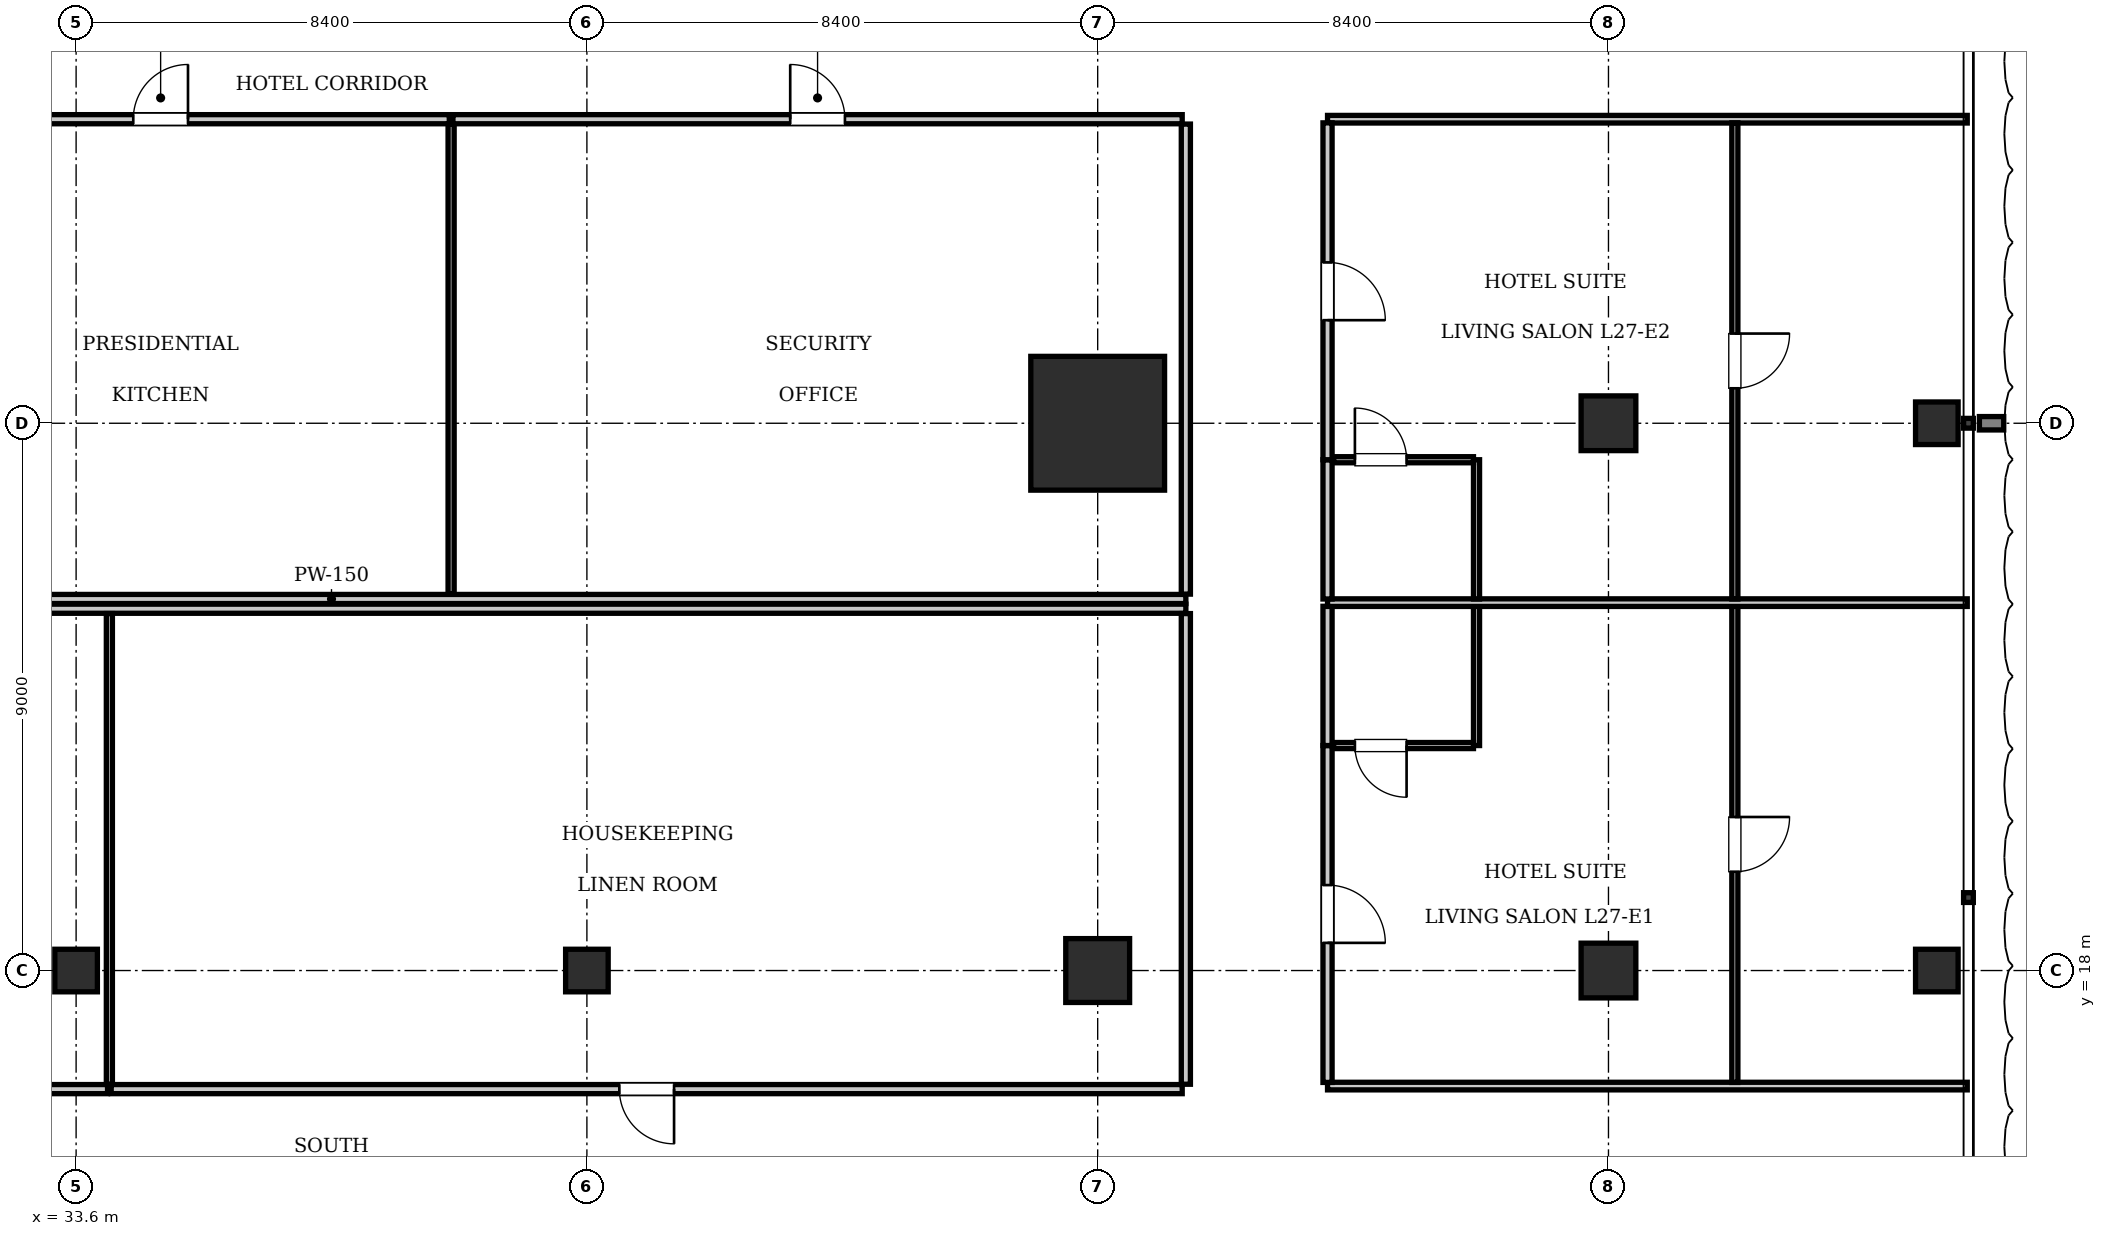
"""IFC4 building model, lengths in metres.
Left out: names, types, materials, properties, quantities, classifications, styles, units other than length and angle.
Written with IfcOpenShell. Run it as: python <this file> out.ifc"""

import sys

from ifc_helpers import new_model, si_unit, direction, frame, frame_2d, origin, origin_2d, place, context, subcontext, project, spatial, rectangle, i_section, extrude, element, fill, save


model = new_model("IFC4")
c1 = context("Model", 3, precision=1e-05, world=origin(), true_north=direction((0.0, 1.0)))
c2 = subcontext(c1, "Body", "Model", "MODEL_VIEW")
j1 = project(units=[si_unit("LENGTHUNIT", "METRE"), si_unit("PLANEANGLEUNIT", "RADIAN")], contexts=[c1])
p1 = place(None, origin())
s1 = spatial("IfcSite", under=j1, at=p1, CompositionType="ELEMENT")
p2 = place(p1, origin())
s2 = spatial("IfcBuilding", under=s1, at=p2, CompositionType="ELEMENT")
p3 = place(p2, frame((0.0, 0.0, 111.65)))
s3 = spatial("IfcBuildingStorey", under=s2, at=p3, CompositionType="ELEMENT", Elevation=111.65)
p4 = place(p3, frame((50.4, 27.0, 0.0), z_axis=(0.0, 0.0, 1.0), x_axis=(1.0, 0.0, 0.0)))
e1 = element("IfcColumn", 1, at=p4, inside=s3, PredefinedType="COLUMN", context=c2, shape_type="SweptSolid", body=[
    extrude(rectangle(XDim=2.2, YDim=2.2, at=origin_2d()), origin(), (0.0, 0.0, 1.0), 3.85),
])
p5 = place(p3, frame((50.4, 18.0, 0.0), z_axis=(0.0, 0.0, 1.0), x_axis=(1.0, 0.0, 0.0)))
e2 = element("IfcColumn", 2, at=p5, inside=s3, PredefinedType="COLUMN", context=c2, shape_type="SweptSolid", body=[
    extrude(rectangle(XDim=1.05, YDim=1.05, at=origin_2d()), origin(), (0.0, 0.0, 1.0), 3.85),
])
for number, where, z_axis, x_axis in (
    (3, (33.6, 18.0, 0.0), (0.0, 0.0, 1.0), (1.0, 0.0, 0.0)),
    (4, (42.0, 18.0, 0.0), (0.0, 0.0, 1.0), (1.0, 0.0, 0.0)),
):
    element("IfcColumn", number, at=place(p3, frame(where, z_axis=z_axis, x_axis=x_axis)), inside=s3, PredefinedType="COLUMN", context=c2, shape_type="SweptSolid", body=[
        extrude(i_section(OverallWidth=0.7, OverallDepth=0.7, WebThickness=0.028, FlangeThickness=0.044, at=origin_2d()), origin(), (0.0, 0.0, 1.0), 3.85),
    ])
for number, where, z_axis, x_axis in (
    (5, (58.8, 18.0, 0.0), (0.0, 0.0, 1.0), (1.0, 0.0, 0.0)),
    (6, (58.8, 27.0, 0.0), (0.0, 0.0, 1.0), (1.0, 0.0, 0.0)),
):
    element("IfcColumn", number, at=place(p3, frame(where, z_axis=z_axis, x_axis=x_axis)), inside=s3, PredefinedType="COLUMN", context=c2, shape_type="SweptSolid", body=[
        extrude(rectangle(XDim=0.9, YDim=0.9, at=origin_2d()), origin(), (0.0, 0.0, 1.0), 3.85),
    ])
for number, where, z_axis, x_axis in (
    (7, (64.2, 18.0, 0.0), (0.0, 0.0, 1.0), (1.0, 0.0, 0.0)),
    (8, (64.2, 27.0, 0.0), (0.0, 0.0, 1.0), (1.0, 0.0, 0.0)),
):
    element("IfcColumn", number, at=place(p3, frame(where, z_axis=z_axis, x_axis=x_axis)), inside=s3, PredefinedType="COLUMN", context=c2, shape_type="SweptSolid", body=[
        extrude(i_section(OverallWidth=0.7, OverallDepth=0.7, WebThickness=0.028, FlangeThickness=0.044, at=origin_2d()), origin(), (0.0, 0.0, 1.0), 3.85),
    ])
p6 = place(p3, frame((23.75, 24.11, 0.0), z_axis=(0.0, 0.0, 1.0), x_axis=(1.0, 0.0, 0.0)))
e9 = element("IfcWall", 9, at=p6, inside=s3, PredefinedType="PARTITIONING", context=c2, shape_type="SweptSolid", body=[
    extrude(rectangle(XDim=28.1, YDim=0.15, at=frame_2d((14.05, 0.0))), origin(), (0.0, 0.0, 1.0), 3.55),
])
p7 = place(p3, frame((51.85, 24.19, 0.0), z_axis=(0.0, 0.0, 1.0), x_axis=(0.0, 1.0, 0.0)))
e10 = element("IfcWall", 10, at=p7, inside=s3, PredefinedType="PARTITIONING", context=c2, shape_type="SweptSolid", body=[
    extrude(rectangle(XDim=7.73, YDim=0.15, at=frame_2d((3.865, 0.0))), origin(), (0.0, 0.0, 1.0), 3.55),
])
p8 = place(p3, frame((30.243, 32.0, 0.0), z_axis=(0.0, 0.0, 1.0), x_axis=(1.0, 0.0, 0.0)))
e11 = element("IfcWall", 11, at=p8, inside=s3, PredefinedType="PARTITIONING", context=c2, shape_type="SweptSolid", body=[
    extrude(rectangle(XDim=9.494, YDim=0.15, at=frame_2d((4.747, 0.0))), origin(), (0.0, 0.0, 1.0), 3.55),
])
p9 = place(p8, frame((4.297, 0.0, 0.0)))
e12 = element("IfcOpeningElement", 12, at=p9, cuts=e11, PredefinedType="OPENING", context=c2, shape_type="SweptSolid", body=[
    extrude(rectangle(XDim=0.9, YDim=2.1, at=frame_2d((0.45, 1.05))), frame((0.0, 0.085, 0.0), z_axis=(0.0, -1.0, 0.0), x_axis=(1.0, 0.0, 0.0)), (0.0, 0.0, 1.0), 0.17),
])
p10 = place(p3, frame((39.767, 24.19, 0.0), z_axis=(0.0, 0.0, 1.0), x_axis=(0.0, 1.0, 0.0)))
e13 = element("IfcWall", 13, at=p10, inside=s3, PredefinedType="PARTITIONING", context=c2, shape_type="SweptSolid", body=[
    extrude(rectangle(XDim=7.73, YDim=0.1, at=frame_2d((3.865, 0.0))), origin(), (0.0, 0.0, 1.0), 3.55),
])
p11 = place(p3, frame((39.797, 32.0, 0.0), z_axis=(0.0, 0.0, 1.0), x_axis=(1.0, 0.0, 0.0)))
e14 = element("IfcWall", 14, at=p11, inside=s3, PredefinedType="PARTITIONING", context=c2, shape_type="SweptSolid", body=[
    extrude(rectangle(XDim=11.993, YDim=0.15, at=frame_2d((5.997, 0.0))), origin(), (0.0, 0.0, 1.0), 3.55),
])
p12 = place(p11, frame((5.546, 0.0, 0.0)))
e15 = element("IfcOpeningElement", 15, at=p12, cuts=e14, PredefinedType="OPENING", context=c2, shape_type="SweptSolid", body=[
    extrude(rectangle(XDim=0.9, YDim=2.1, at=frame_2d((0.45, 1.05))), frame((0.0, 0.085, 0.0), z_axis=(0.0, -1.0, 0.0), x_axis=(1.0, 0.0, 0.0)), (0.0, 0.0, 1.0), 0.17),
])
p13 = place(p3, frame((23.75, 23.95, 0.0), z_axis=(0.0, 0.0, 1.0), x_axis=(1.0, 0.0, 0.0)))
e16 = element("IfcWall", 16, at=p13, inside=s3, PredefinedType="PARTITIONING", context=c2, shape_type="SweptSolid", body=[
    extrude(rectangle(XDim=28.1, YDim=0.15, at=frame_2d((14.05, 0.0))), origin(), (0.0, 0.0, 1.0), 3.55),
])
p14 = place(p3, frame((51.85, 16.13, 0.0), z_axis=(0.0, 0.0, 1.0), x_axis=(0.0, 1.0, 0.0)))
e17 = element("IfcWall", 17, at=p14, inside=s3, PredefinedType="PARTITIONING", context=c2, shape_type="SweptSolid", body=[
    extrude(rectangle(XDim=7.74, YDim=0.15, at=frame_2d((3.87, 0.0))), origin(), (0.0, 0.0, 1.0), 3.55),
])
p15 = place(p3, frame((23.81, 16.05, 0.0), z_axis=(0.0, 0.0, 1.0), x_axis=(1.0, 0.0, 0.0)))
e18 = element("IfcWall", 18, at=p15, inside=s3, PredefinedType="PARTITIONING", context=c2, shape_type="SweptSolid", body=[
    extrude(rectangle(XDim=10.307, YDim=0.15, at=frame_2d((5.153, 0.0))), origin(), (0.0, 0.0, 1.0), 3.55),
])
p16 = place(p15, frame((4.704, 0.0, 0.0)))
e19 = element("IfcOpeningElement", 19, at=p16, cuts=e18, PredefinedType="OPENING", context=c2, shape_type="SweptSolid", body=[
    extrude(rectangle(XDim=0.9, YDim=2.1, at=frame_2d((0.45, 1.05))), frame((0.0, 0.085, 0.0), z_axis=(0.0, -1.0, 0.0), x_axis=(1.0, 0.0, 0.0)), (0.0, 0.0, 1.0), 0.17),
])
p17 = place(p3, frame((34.147, 16.13, 0.0), z_axis=(0.0, 0.0, 1.0), x_axis=(0.0, 1.0, 0.0)))
e20 = element("IfcWall", 20, at=p17, inside=s3, PredefinedType="PARTITIONING", context=c2, shape_type="SweptSolid", body=[
    extrude(rectangle(XDim=7.74, YDim=0.1, at=frame_2d((3.87, 0.0))), origin(), (0.0, 0.0, 1.0), 3.55),
])
p18 = place(p3, frame((34.177, 16.05, 0.0), z_axis=(0.0, 0.0, 1.0), x_axis=(1.0, 0.0, 0.0)))
e21 = element("IfcWall", 21, at=p18, inside=s3, PredefinedType="PARTITIONING", context=c2, shape_type="SweptSolid", body=[
    extrude(rectangle(XDim=17.613, YDim=0.15, at=frame_2d((8.807, 0.0))), origin(), (0.0, 0.0, 1.0), 3.55),
])
p19 = place(p18, frame((8.356, 0.0, 0.0)))
e22 = element("IfcOpeningElement", 22, at=p19, cuts=e21, PredefinedType="OPENING", context=c2, shape_type="SweptSolid", body=[
    extrude(rectangle(XDim=0.9, YDim=2.1, at=frame_2d((0.45, 1.05))), frame((0.0, 0.085, 0.0), z_axis=(0.0, -1.0, 0.0), x_axis=(1.0, 0.0, 0.0)), (0.0, 0.0, 1.0), 0.17),
])
for number, where, z_axis, x_axis in (
    (23, (54.18, 16.1, 0.0), (0.0, 0.0, 1.0), (1.0, 0.0, 0.0)),
    (24, (54.18, 32.0, 0.0), (0.0, 0.0, 1.0), (1.0, 0.0, 0.0)),
):
    element("IfcWall", number, at=place(p3, frame(where, z_axis=z_axis, x_axis=x_axis)), inside=s3, PredefinedType="PARTITIONING", context=c2, shape_type="SweptSolid", body=[
        extrude(rectangle(XDim=10.52, YDim=0.125, at=frame_2d((5.26, 0.0))), origin(), (0.0, 0.0, 1.0), 3.55),
    ])
p20 = place(p3, frame((54.18, 16.16, 0.0), z_axis=(0.0, 0.0, 1.0), x_axis=(0.0, 1.0, 0.0)))
e25 = element("IfcWall", 25, at=p20, inside=s3, PredefinedType="PARTITIONING", context=c2, shape_type="SweptSolid", body=[
    extrude(rectangle(XDim=5.54, YDim=0.15, at=frame_2d((2.77, 0.0))), origin(), (0.0, 0.0, 1.0), 3.55),
])
p21 = place(p20, frame((2.295, 0.0, 0.0)))
e26 = element("IfcOpeningElement", 26, at=p21, cuts=e25, PredefinedType="OPENING", context=c2, shape_type="SweptSolid", body=[
    extrude(rectangle(XDim=0.95, YDim=2.15, at=frame_2d((0.475, 1.075))), frame((0.0, 0.085, 0.0), z_axis=(0.0, -1.0, 0.0), x_axis=(1.0, 0.0, 0.0)), (0.0, 0.0, 1.0), 0.17),
])
p22 = place(p3, frame((54.18, 21.7, 0.0), z_axis=(0.0, 0.0, 1.0), x_axis=(0.0, 1.0, 0.0)))
e27 = element("IfcWall", 27, at=p22, inside=s3, PredefinedType="PARTITIONING", context=c2, shape_type="SweptSolid", body=[
    extrude(rectangle(XDim=2.29, YDim=0.15, at=frame_2d((1.145, 0.0))), origin(), (0.0, 0.0, 1.0), 3.55),
])
p23 = place(p3, frame((56.63, 21.7, 0.0), z_axis=(0.0, 0.0, 1.0), x_axis=(0.0, 1.0, 0.0)))
e28 = element("IfcWall", 28, at=p23, inside=s3, PredefinedType="PARTITIONING", context=c2, shape_type="SweptSolid", body=[
    extrude(rectangle(XDim=2.29, YDim=0.1, at=frame_2d((1.145, 0.0))), origin(), (0.0, 0.0, 1.0), 3.55),
])
p24 = place(p3, frame((54.28, 21.7, 0.0), z_axis=(0.0, 0.0, 1.0), x_axis=(1.0, 0.0, 0.0)))
e29 = element("IfcWall", 29, at=p24, inside=s3, PredefinedType="PARTITIONING", context=c2, shape_type="SweptSolid", body=[
    extrude(rectangle(XDim=2.3, YDim=0.1, at=frame_2d((1.15, 0.0))), origin(), (0.0, 0.0, 1.0), 3.55),
])
p25 = place(p24, frame((0.35, 0.0, 0.0)))
e30 = element("IfcOpeningElement", 30, at=p25, cuts=e29, PredefinedType="OPENING", context=c2, shape_type="SweptSolid", body=[
    extrude(rectangle(XDim=0.85, YDim=2.1, at=frame_2d((0.425, 1.05))), frame((0.0, 0.06, 0.0), z_axis=(0.0, -1.0, 0.0), x_axis=(1.0, 0.0, 0.0)), (0.0, 0.0, 1.0), 0.12),
])
p26 = place(p3, frame((60.878, 16.16, 0.0), z_axis=(0.0, 0.0, 1.0), x_axis=(0.0, 1.0, 0.0)))
e31 = element("IfcWall", 31, at=p26, inside=s3, PredefinedType="PARTITIONING", context=c2, shape_type="SweptSolid", body=[
    extrude(rectangle(XDim=7.83, YDim=0.1, at=frame_2d((3.915, 0.0))), origin(), (0.0, 0.0, 1.0), 3.55),
])
p27 = place(p26, frame((3.465, 0.0, 0.0)))
e32 = element("IfcOpeningElement", 32, at=p27, cuts=e31, PredefinedType="OPENING", context=c2, shape_type="SweptSolid", body=[
    extrude(rectangle(XDim=0.9, YDim=2.1, at=frame_2d((0.45, 1.05))), frame((0.0, 0.06, 0.0), z_axis=(0.0, -1.0, 0.0), x_axis=(1.0, 0.0, 0.0)), (0.0, 0.0, 1.0), 0.12),
])
p28 = place(p3, frame((54.18, 24.05, 0.0), z_axis=(0.0, 0.0, 1.0), x_axis=(1.0, 0.0, 0.0)))
e33 = element("IfcWall", 33, at=p28, inside=s3, PredefinedType="PARTITIONING", context=c2, shape_type="SweptSolid", body=[
    extrude(rectangle(XDim=10.52, YDim=0.125, at=frame_2d((5.26, 0.0))), origin(), (0.0, 0.0, 1.0), 3.55),
])
p29 = place(p3, frame((54.18, 24.11, 0.0), z_axis=(0.0, 0.0, 1.0), x_axis=(0.0, 1.0, 0.0)))
e34 = element("IfcWall", 34, at=p29, inside=s3, PredefinedType="PARTITIONING", context=c2, shape_type="SweptSolid", body=[
    extrude(rectangle(XDim=2.29, YDim=0.15, at=frame_2d((1.145, 0.0))), origin(), (0.0, 0.0, 1.0), 3.55),
])
p30 = place(p3, frame((54.18, 26.4, 0.0), z_axis=(0.0, 0.0, 1.0), x_axis=(0.0, 1.0, 0.0)))
e35 = element("IfcWall", 35, at=p30, inside=s3, PredefinedType="PARTITIONING", context=c2, shape_type="SweptSolid", body=[
    extrude(rectangle(XDim=5.54, YDim=0.15, at=frame_2d((2.77, 0.0))), origin(), (0.0, 0.0, 1.0), 3.55),
])
p31 = place(p30, frame((2.295, 0.0, 0.0)))
e36 = element("IfcOpeningElement", 36, at=p31, cuts=e35, PredefinedType="OPENING", context=c2, shape_type="SweptSolid", body=[
    extrude(rectangle(XDim=0.95, YDim=2.15, at=frame_2d((0.475, 1.075))), frame((0.0, 0.085, 0.0), z_axis=(0.0, -1.0, 0.0), x_axis=(1.0, 0.0, 0.0)), (0.0, 0.0, 1.0), 0.17),
])
p32 = place(p3, frame((56.63, 24.11, 0.0), z_axis=(0.0, 0.0, 1.0), x_axis=(0.0, 1.0, 0.0)))
e37 = element("IfcWall", 37, at=p32, inside=s3, PredefinedType="PARTITIONING", context=c2, shape_type="SweptSolid", body=[
    extrude(rectangle(XDim=2.29, YDim=0.1, at=frame_2d((1.145, 0.0))), origin(), (0.0, 0.0, 1.0), 3.55),
])
p33 = place(p3, frame((54.28, 26.4, 0.0), z_axis=(0.0, 0.0, 1.0), x_axis=(1.0, 0.0, 0.0)))
e38 = element("IfcWall", 38, at=p33, inside=s3, PredefinedType="PARTITIONING", context=c2, shape_type="SweptSolid", body=[
    extrude(rectangle(XDim=2.3, YDim=0.1, at=frame_2d((1.15, 0.0))), origin(), (0.0, 0.0, 1.0), 3.55),
])
p34 = place(p33, frame((0.35, 0.0, 0.0)))
e39 = element("IfcOpeningElement", 39, at=p34, cuts=e38, PredefinedType="OPENING", context=c2, shape_type="SweptSolid", body=[
    extrude(rectangle(XDim=0.85, YDim=2.1, at=frame_2d((0.425, 1.05))), frame((0.0, 0.06, 0.0), z_axis=(0.0, -1.0, 0.0), x_axis=(1.0, 0.0, 0.0)), (0.0, 0.0, 1.0), 0.12),
])
p35 = place(p3, frame((60.878, 24.11, 0.0), z_axis=(0.0, 0.0, 1.0), x_axis=(0.0, 1.0, 0.0)))
e40 = element("IfcWall", 40, at=p35, inside=s3, PredefinedType="PARTITIONING", context=c2, shape_type="SweptSolid", body=[
    extrude(rectangle(XDim=7.83, YDim=0.1, at=frame_2d((3.915, 0.0))), origin(), (0.0, 0.0, 1.0), 3.55),
])
p36 = place(p35, frame((3.465, 0.0, 0.0)))
e41 = element("IfcOpeningElement", 41, at=p36, cuts=e40, PredefinedType="OPENING", context=c2, shape_type="SweptSolid", body=[
    extrude(rectangle(XDim=0.9, YDim=2.1, at=frame_2d((0.45, 1.05))), frame((0.0, 0.06, 0.0), z_axis=(0.0, -1.0, 0.0), x_axis=(1.0, 0.0, 0.0)), (0.0, 0.0, 1.0), 0.12),
])
p37 = place(p9, origin())
e42 = element("IfcDoor", 42, at=p37, inside=s3, OperationType="SINGLE_SWING_RIGHT", PredefinedType="DOOR", context=c2, shape_type="SweptSolid", body=[
    extrude(rectangle(XDim=0.9, YDim=2.1, at=frame_2d((0.45, 1.05))), frame((0.0, 0.025, 0.0), z_axis=(0.0, -1.0, 0.0), x_axis=(1.0, 0.0, 0.0)), (0.0, 0.0, 1.0), 0.05),
])
fill(e12, e42)
p38 = place(p12, origin())
e43 = element("IfcDoor", 43, at=p38, inside=s3, OperationType="SINGLE_SWING_LEFT", PredefinedType="DOOR", context=c2, shape_type="SweptSolid", body=[
    extrude(rectangle(XDim=0.9, YDim=2.1, at=frame_2d((0.45, 1.05))), frame((0.0, 0.025, 0.0), z_axis=(0.0, -1.0, 0.0), x_axis=(1.0, 0.0, 0.0)), (0.0, 0.0, 1.0), 0.05),
])
fill(e15, e43)
p39 = place(p19, frame((0.9, 0.0, 0.0), z_axis=(0.0, 0.0, 1.0), x_axis=(-1.0, 0.0, 0.0)))
e44 = element("IfcDoor", 44, at=p39, inside=s3, OperationType="SINGLE_SWING_LEFT", PredefinedType="DOOR", context=c2, shape_type="SweptSolid", body=[
    extrude(rectangle(XDim=0.9, YDim=2.1, at=frame_2d((0.45, 1.05))), frame((0.0, 0.025, 0.0), z_axis=(0.0, -1.0, 0.0), x_axis=(1.0, 0.0, 0.0)), (0.0, 0.0, 1.0), 0.05),
])
fill(e22, e44)
p40 = place(p25, frame((0.85, 0.0, 0.0), z_axis=(0.0, 0.0, 1.0), x_axis=(-1.0, 0.0, 0.0)))
e45 = element("IfcDoor", 45, at=p40, inside=s3, OperationType="SINGLE_SWING_LEFT", PredefinedType="DOOR", context=c2, shape_type="SweptSolid", body=[
    extrude(rectangle(XDim=0.85, YDim=2.1, at=frame_2d((0.425, 1.05))), frame((0.0, 0.025, 0.0), z_axis=(0.0, -1.0, 0.0), x_axis=(1.0, 0.0, 0.0)), (0.0, 0.0, 1.0), 0.05),
])
fill(e30, e45)
p41 = place(p21, frame((0.95, 0.0, 0.0), z_axis=(0.0, 0.0, 1.0), x_axis=(-1.0, 0.0, 0.0)))
e46 = element("IfcDoor", 46, at=p41, inside=s3, OperationType="SINGLE_SWING_RIGHT", PredefinedType="DOOR", context=c2, shape_type="SweptSolid", body=[
    extrude(rectangle(XDim=0.95, YDim=2.15, at=frame_2d((0.475, 1.075))), frame((0.0, 0.025, 0.0), z_axis=(0.0, -1.0, 0.0), x_axis=(1.0, 0.0, 0.0)), (0.0, 0.0, 1.0), 0.05),
])
fill(e26, e46)
p42 = place(p27, frame((0.9, 0.0, 0.0), z_axis=(0.0, 0.0, 1.0), x_axis=(-1.0, 0.0, 0.0)))
e47 = element("IfcDoor", 47, at=p42, inside=s3, OperationType="SINGLE_SWING_LEFT", PredefinedType="DOOR", context=c2, shape_type="SweptSolid", body=[
    extrude(rectangle(XDim=0.9, YDim=2.1, at=frame_2d((0.45, 1.05))), frame((0.0, 0.025, 0.0), z_axis=(0.0, -1.0, 0.0), x_axis=(1.0, 0.0, 0.0)), (0.0, 0.0, 1.0), 0.05),
])
fill(e32, e47)
p43 = place(p34, origin())
e48 = element("IfcDoor", 48, at=p43, inside=s3, OperationType="SINGLE_SWING_LEFT", PredefinedType="DOOR", context=c2, shape_type="SweptSolid", body=[
    extrude(rectangle(XDim=0.85, YDim=2.1, at=frame_2d((0.425, 1.05))), frame((0.0, 0.025, 0.0), z_axis=(0.0, -1.0, 0.0), x_axis=(1.0, 0.0, 0.0)), (0.0, 0.0, 1.0), 0.05),
])
fill(e39, e48)
p44 = place(p31, frame((0.95, 0.0, 0.0), z_axis=(0.0, 0.0, 1.0), x_axis=(-1.0, 0.0, 0.0)))
e49 = element("IfcDoor", 49, at=p44, inside=s3, OperationType="SINGLE_SWING_RIGHT", PredefinedType="DOOR", context=c2, shape_type="SweptSolid", body=[
    extrude(rectangle(XDim=0.95, YDim=2.15, at=frame_2d((0.475, 1.075))), frame((0.0, 0.025, 0.0), z_axis=(0.0, -1.0, 0.0), x_axis=(1.0, 0.0, 0.0)), (0.0, 0.0, 1.0), 0.05),
])
fill(e36, e49)
p45 = place(p36, frame((0.9, 0.0, 0.0), z_axis=(0.0, 0.0, 1.0), x_axis=(-1.0, 0.0, 0.0)))
e50 = element("IfcDoor", 50, at=p45, inside=s3, OperationType="SINGLE_SWING_LEFT", PredefinedType="DOOR", context=c2, shape_type="SweptSolid", body=[
    extrude(rectangle(XDim=0.9, YDim=2.1, at=frame_2d((0.45, 1.05))), frame((0.0, 0.025, 0.0), z_axis=(0.0, -1.0, 0.0), x_axis=(1.0, 0.0, 0.0)), (0.0, 0.0, 1.0), 0.05),
])
fill(e41, e50)
save(model, sys.argv[1])
